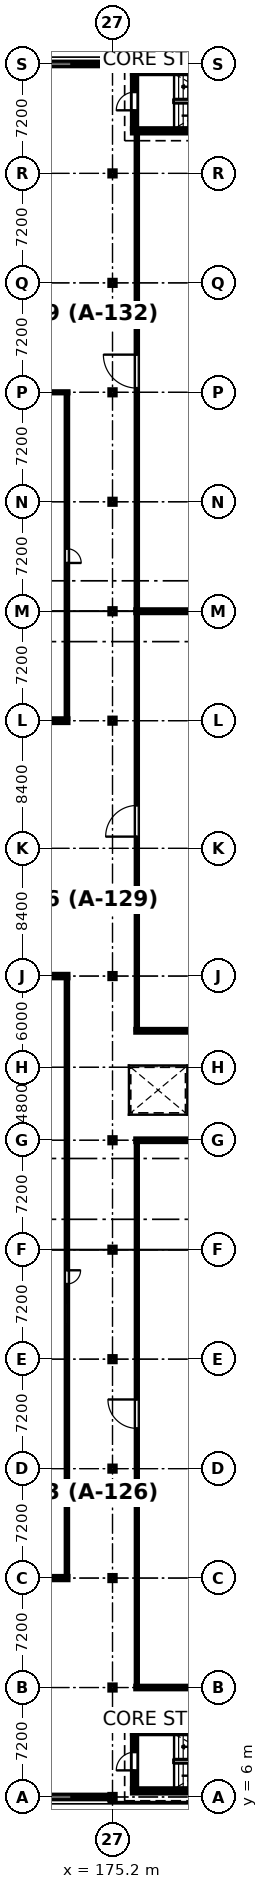
"""IFC4 building model, lengths in metres.
Left out: names, types, materials, properties, quantities, classifications, styles, units other than length and angle.
Written with IfcOpenShell. Run it as: python <this file> out.ifc"""

import sys

from ifc_helpers import new_model, si_unit, direction, frame, frame_2d, origin, origin_2d, place, context, subcontext, project, spatial, rectangle, i_section, extrude, element, fill, save


model = new_model("IFC4")
c1 = context("Model", 3, precision=1e-05, world=origin(), true_north=direction((0.0, 1.0)))
c2 = subcontext(c1, "Body", "Model", "MODEL_VIEW")
j1 = project(units=[si_unit("LENGTHUNIT", "METRE"), si_unit("PLANEANGLEUNIT", "RADIAN")], contexts=[c1])
p1 = place(None, origin())
s1 = spatial("IfcSite", under=j1, at=p1, CompositionType="ELEMENT")
p2 = place(p1, origin())
s2 = spatial("IfcBuilding", under=s1, at=p2, CompositionType="ELEMENT")
p3 = place(p2, frame((0.0, 0.0, 9.3)))
s3 = spatial("IfcBuildingStorey", under=s2, at=p3, CompositionType="ELEMENT", Elevation=9.3)
for number, where, z_axis, x_axis in (
    (1, (175.2, 6.0, 0.0), (0.0, 0.0, 1.0), (1.0, 0.0, 0.0)),
    (2, (175.2, 13.2, 0.0), (0.0, 0.0, 1.0), (1.0, 0.0, 0.0)),
    (3, (175.2, 20.4, 0.0), (0.0, 0.0, 1.0), (1.0, 0.0, 0.0)),
    (4, (175.2, 27.6, 0.0), (0.0, 0.0, 1.0), (1.0, 0.0, 0.0)),
    (5, (175.2, 34.8, 0.0), (0.0, 0.0, 1.0), (1.0, 0.0, 0.0)),
    (6, (175.2, 42.0, 0.0), (0.0, 0.0, 1.0), (1.0, 0.0, 0.0)),
    (7, (175.2, 49.2, 0.0), (0.0, 0.0, 1.0), (1.0, 0.0, 0.0)),
    (8, (175.2, 60.0, 0.0), (0.0, 0.0, 1.0), (1.0, 0.0, 0.0)),
    (9, (175.2, 76.8, 0.0), (0.0, 0.0, 1.0), (1.0, 0.0, 0.0)),
    (10, (175.2, 84.0, 0.0), (0.0, 0.0, 1.0), (1.0, 0.0, 0.0)),
    (11, (175.2, 91.2, 0.0), (0.0, 0.0, 1.0), (1.0, 0.0, 0.0)),
    (12, (175.2, 98.4, 0.0), (0.0, 0.0, 1.0), (1.0, 0.0, 0.0)),
    (13, (175.2, 105.6, 0.0), (0.0, 0.0, 1.0), (1.0, 0.0, 0.0)),
    (14, (175.2, 112.8, 0.0), (0.0, 0.0, 1.0), (1.0, 0.0, 0.0)),
    (15, (175.2, 120.0, 0.0), (0.0, 0.0, 1.0), (1.0, 0.0, 0.0)),
):
    element("IfcColumn", number, at=place(p3, frame(where, z_axis=z_axis, x_axis=x_axis)), inside=s3, PredefinedType="COLUMN", context=c2, shape_type="SweptSolid", body=[
        extrude(i_section(OverallWidth=0.368, OverallDepth=0.356, WebThickness=0.011, FlangeThickness=0.018, FilletRadius=0.015, at=origin_2d()), origin(), (0.0, 0.0, 1.0), 3.9),
    ])
p4 = place(p3, frame((175.009, 6.0, 0.0), z_axis=(0.0, 0.0, 1.0), x_axis=(-1.0, 0.0, 0.0)))
e16 = element("IfcWall", 16, at=p4, inside=s3, PredefinedType="STANDARD", context=c2, shape_type="SweptSolid", body=[
    extrude(rectangle(XDim=6.818, YDim=0.26, at=frame_2d((3.409, 0.0))), origin(), (0.0, 0.0, 1.0), 2.828),
])
p5 = place(p4, frame((2.509, 0.0, 0.9)))
e17 = element("IfcOpeningElement", 17, at=p5, cuts=e16, PredefinedType="OPENING", context=c2, shape_type="SweptSolid", body=[
    extrude(rectangle(XDim=1.8, YDim=1.5, at=frame_2d((0.9, 0.75))), frame((0.0, 0.14, 0.0), z_axis=(0.0, -1.0, 0.0), x_axis=(1.0, 0.0, 0.0)), (0.0, 0.0, 1.0), 0.28),
])
p6 = place(p3, frame((168.191, 120.0, 0.0), z_axis=(0.0, 0.0, 1.0), x_axis=(1.0, 0.0, 0.0)))
e18 = element("IfcWall", 18, at=p6, inside=s3, PredefinedType="STANDARD", context=c2, shape_type="SweptSolid", body=[
    extrude(rectangle(XDim=6.818, YDim=0.26, at=frame_2d((3.409, 0.0))), origin(), (0.0, 0.0, 1.0), 2.828),
])
p7 = place(p6, frame((2.509, 0.0, 0.9)))
e19 = element("IfcOpeningElement", 19, at=p7, cuts=e18, PredefinedType="OPENING", context=c2, shape_type="SweptSolid", body=[
    extrude(rectangle(XDim=1.8, YDim=1.5, at=frame_2d((0.9, 0.75))), frame((0.0, 0.14, 0.0), z_axis=(0.0, -1.0, 0.0), x_axis=(1.0, 0.0, 0.0)), (0.0, 0.0, 1.0), 0.28),
])
for number, where, z_axis, x_axis in (
    (20, (185.9, 6.4, 0.0), (0.0, 0.0, 1.0), (-1.0, 0.0, 0.0)),
    (21, (176.5, 10.3, 0.0), (0.0, 0.0, 1.0), (1.0, 0.0, 0.0)),
):
    element("IfcWall", number, at=place(p3, frame(where, z_axis=z_axis, x_axis=x_axis)), inside=s3, PredefinedType="SOLIDWALL", context=c2, shape_type="SweptSolid", body=[
        extrude(rectangle(XDim=9.4, YDim=0.3, at=frame_2d((4.7, 0.0))), origin(), (0.0, 0.0, 1.0), 3.6),
    ])
p8 = place(p3, frame((176.65, 6.55, 0.0), z_axis=(0.0, 0.0, 1.0), x_axis=(0.0, 1.0, 0.0)))
e22 = element("IfcWall", 22, at=p8, inside=s3, PredefinedType="SOLIDWALL", context=c2, shape_type="SweptSolid", body=[
    extrude(rectangle(XDim=3.6, YDim=0.3, at=frame_2d((1.8, 0.0))), origin(), (0.0, 0.0, 1.0), 3.6),
])
p9 = place(p8, frame((1.2, 0.0, 0.0)))
e23 = element("IfcOpeningElement", 23, at=p9, cuts=e22, PredefinedType="OPENING", context=c2, shape_type="SweptSolid", body=[
    extrude(rectangle(XDim=1.2, YDim=2.2, at=frame_2d((0.6, 1.1))), frame((0.0, 0.16, 0.0), z_axis=(0.0, -1.0, 0.0), x_axis=(1.0, 0.0, 0.0)), (0.0, 0.0, 1.0), 0.32),
])
for number, where, z_axis, x_axis in (
    (24, (185.9, 115.6, 0.0), (0.0, 0.0, 1.0), (-1.0, 0.0, 0.0)),
    (25, (176.5, 119.5, 0.0), (0.0, 0.0, 1.0), (1.0, 0.0, 0.0)),
):
    element("IfcWall", number, at=place(p3, frame(where, z_axis=z_axis, x_axis=x_axis)), inside=s3, PredefinedType="SOLIDWALL", context=c2, shape_type="SweptSolid", body=[
        extrude(rectangle(XDim=9.4, YDim=0.3, at=frame_2d((4.7, 0.0))), origin(), (0.0, 0.0, 1.0), 3.6),
    ])
p10 = place(p3, frame((176.65, 115.75, 0.0), z_axis=(0.0, 0.0, 1.0), x_axis=(0.0, 1.0, 0.0)))
e26 = element("IfcWall", 26, at=p10, inside=s3, PredefinedType="SOLIDWALL", context=c2, shape_type="SweptSolid", body=[
    extrude(rectangle(XDim=3.6, YDim=0.3, at=frame_2d((1.8, 0.0))), origin(), (0.0, 0.0, 1.0), 3.6),
])
p11 = place(p10, frame((1.2, 0.0, 0.0)))
e27 = element("IfcOpeningElement", 27, at=p11, cuts=e26, PredefinedType="OPENING", context=c2, shape_type="SweptSolid", body=[
    extrude(rectangle(XDim=1.2, YDim=2.2, at=frame_2d((0.6, 1.1))), frame((0.0, 0.16, 0.0), z_axis=(0.0, -1.0, 0.0), x_axis=(1.0, 0.0, 0.0)), (0.0, 0.0, 1.0), 0.32),
])
p12 = place(p3, frame((189.468, 13.2, 0.0), z_axis=(0.0, 0.0, 1.0), x_axis=(-1.0, 0.0, 0.0)))
e28 = element("IfcWall", 28, at=p12, inside=s3, PredefinedType="PARTITIONING", context=c2, shape_type="SweptSolid", body=[
    extrude(rectangle(XDim=12.748, YDim=0.192, at=frame_2d((6.374, 0.0))), origin(), (0.0, 0.0, 1.0), 2.823),
])
p13 = place(p3, frame((176.72, 49.2, 0.0), z_axis=(0.0, 0.0, 1.0), x_axis=(1.0, 0.0, 0.0)))
e29 = element("IfcWall", 29, at=p13, inside=s3, PredefinedType="PARTITIONING", context=c2, shape_type="SweptSolid", body=[
    extrude(rectangle(XDim=12.748, YDim=0.198, at=frame_2d((6.374, 0.0))), origin(), (0.0, 0.0, 1.0), 2.823),
])
p14 = place(p3, frame((189.468, 56.4, 0.0), z_axis=(0.0, 0.0, 1.0), x_axis=(-1.0, 0.0, 0.0)))
e30 = element("IfcWall", 30, at=p14, inside=s3, PredefinedType="PARTITIONING", context=c2, shape_type="SweptSolid", body=[
    extrude(rectangle(XDim=12.748, YDim=0.205, at=frame_2d((6.374, 0.0))), origin(), (0.0, 0.0, 1.0), 2.823),
])
p15 = place(p3, frame((176.72, 84.0, 0.0), z_axis=(0.0, 0.0, 1.0), x_axis=(1.0, 0.0, 0.0)))
e31 = element("IfcWall", 31, at=p15, inside=s3, PredefinedType="PARTITIONING", context=c2, shape_type="SweptSolid", body=[
    extrude(rectangle(XDim=12.748, YDim=0.212, at=frame_2d((6.374, 0.0))), origin(), (0.0, 0.0, 1.0), 2.823),
])
p16 = place(p3, frame((172.28, 20.4, 0.0), z_axis=(0.0, 0.0, 1.0), x_axis=(-1.0, 0.0, 0.0)))
e32 = element("IfcWall", 32, at=p16, inside=s3, PredefinedType="PARTITIONING", context=c2, shape_type="SweptSolid", body=[
    extrude(rectangle(XDim=18.548, YDim=0.235, at=frame_2d((9.274, 0.0))), origin(), (0.0, 0.0, 1.0), 2.823),
])
p17 = place(p3, frame((153.732, 60.0, 0.0), z_axis=(0.0, 0.0, 1.0), x_axis=(1.0, 0.0, 0.0)))
e33 = element("IfcWall", 33, at=p17, inside=s3, PredefinedType="PARTITIONING", context=c2, shape_type="SweptSolid", body=[
    extrude(rectangle(XDim=18.548, YDim=0.25, at=frame_2d((9.274, 0.0))), origin(), (0.0, 0.0, 1.0), 2.823),
])
p18 = place(p3, frame((172.28, 76.8, 0.0), z_axis=(0.0, 0.0, 1.0), x_axis=(-1.0, 0.0, 0.0)))
e34 = element("IfcWall", 34, at=p18, inside=s3, PredefinedType="PARTITIONING", context=c2, shape_type="SweptSolid", body=[
    extrude(rectangle(XDim=18.548, YDim=0.27, at=frame_2d((9.274, 0.0))), origin(), (0.0, 0.0, 1.0), 2.823),
])
p19 = place(p3, frame((153.732, 98.4, 0.0), z_axis=(0.0, 0.0, 1.0), x_axis=(1.0, 0.0, 0.0)))
e35 = element("IfcWall", 35, at=p19, inside=s3, PredefinedType="PARTITIONING", context=c2, shape_type="SweptSolid", body=[
    extrude(rectangle(XDim=18.548, YDim=0.095, at=frame_2d((9.274, 0.0))), origin(), (0.0, 0.0, 1.0), 2.823),
])
p20 = place(p3, frame((176.8, 13.298, 0.0), z_axis=(0.0, 0.0, 1.0), x_axis=(0.0, 1.0, 0.0)))
e36 = element("IfcWall", 36, at=p20, inside=s3, PredefinedType="PARTITIONING", context=c2, shape_type="SweptSolid", body=[
    extrude(rectangle(XDim=35.801, YDim=0.1, at=frame_2d((17.9, 0.0))), origin(), (0.0, 0.0, 1.0), 2.823),
])
p21 = place(p20, frame((16.95, 0.0, 0.0)))
e37 = element("IfcOpeningElement", 37, at=p21, cuts=e36, PredefinedType="OPENING", context=c2, shape_type="SweptSolid", body=[
    extrude(rectangle(XDim=1.9, YDim=2.34, at=frame_2d((0.95, 1.17))), frame((0.0, 0.06, 0.0), z_axis=(0.0, -1.0, 0.0), x_axis=(1.0, 0.0, 0.0)), (0.0, 0.0, 1.0), 0.12),
])
p22 = place(p20, frame((20.1, 0.0, 0.95)))
e38 = element("IfcOpeningElement", 38, at=p22, cuts=e36, PredefinedType="OPENING", context=c2, shape_type="SweptSolid", body=[
    extrude(rectangle(XDim=1.2, YDim=1.0, at=frame_2d((0.6, 0.5))), frame((0.0, 0.06, 0.0), z_axis=(0.0, -1.0, 0.0), x_axis=(1.0, 0.0, 0.0)), (0.0, 0.0, 1.0), 0.12),
])
p23 = place(p3, frame((176.8, 56.504, 0.0), z_axis=(0.0, 0.0, 1.0), x_axis=(0.0, 1.0, 0.0)))
e39 = element("IfcWall", 39, at=p23, inside=s3, PredefinedType="PARTITIONING", context=c2, shape_type="SweptSolid", body=[
    extrude(rectangle(XDim=27.388, YDim=0.105, at=frame_2d((13.694, 0.0))), origin(), (0.0, 0.0, 1.0), 2.823),
])
p24 = place(p23, frame((12.669, 0.0, 0.0)))
e40 = element("IfcOpeningElement", 40, at=p24, cuts=e39, PredefinedType="OPENING", context=c2, shape_type="SweptSolid", body=[
    extrude(rectangle(XDim=2.05, YDim=2.34, at=frame_2d((1.025, 1.17))), frame((0.0, 0.062, 0.0), z_axis=(0.0, -1.0, 0.0), x_axis=(1.0, 0.0, 0.0)), (0.0, 0.0, 1.0), 0.125),
])
p25 = place(p3, frame((176.8, 84.108, 0.0), z_axis=(0.0, 0.0, 1.0), x_axis=(0.0, 1.0, 0.0)))
e41 = element("IfcWall", 41, at=p25, inside=s3, PredefinedType="PARTITIONING", context=c2, shape_type="SweptSolid", body=[
    extrude(rectangle(XDim=31.34, YDim=0.11, at=frame_2d((15.67, 0.0))), origin(), (0.0, 0.0, 1.0), 2.823),
])
p26 = place(p25, frame((14.57, 0.0, 0.0)))
e42 = element("IfcOpeningElement", 42, at=p26, cuts=e41, PredefinedType="OPENING", context=c2, shape_type="SweptSolid", body=[
    extrude(rectangle(XDim=2.2, YDim=2.34, at=frame_2d((1.1, 1.17))), frame((0.0, 0.065, 0.0), z_axis=(0.0, -1.0, 0.0), x_axis=(1.0, 0.0, 0.0)), (0.0, 0.0, 1.0), 0.13),
])
p27 = place(p3, frame((172.2, 59.873, 0.0), z_axis=(0.0, 0.0, 1.0), x_axis=(0.0, -1.0, 0.0)))
e43 = element("IfcWall", 43, at=p27, inside=s3, PredefinedType="PARTITIONING", context=c2, shape_type="SweptSolid", body=[
    extrude(rectangle(XDim=39.354, YDim=0.115, at=frame_2d((19.677, 0.0))), origin(), (0.0, 0.0, 1.0), 2.823),
])
p28 = place(p27, frame((19.227, 0.0, 0.0)))
e44 = element("IfcOpeningElement", 44, at=p28, cuts=e43, PredefinedType="OPENING", context=c2, shape_type="SweptSolid", body=[
    extrude(rectangle(XDim=0.9, YDim=2.1, at=frame_2d((0.45, 1.05))), frame((0.0, 0.067, 0.0), z_axis=(0.0, -1.0, 0.0), x_axis=(1.0, 0.0, 0.0)), (0.0, 0.0, 1.0), 0.135),
])
p29 = place(p27, frame((21.377, 0.0, 0.95)))
e45 = element("IfcOpeningElement", 45, at=p29, cuts=e43, PredefinedType="OPENING", context=c2, shape_type="SweptSolid", body=[
    extrude(rectangle(XDim=1.4, YDim=1.0, at=frame_2d((0.7, 0.5))), frame((0.0, 0.067, 0.0), z_axis=(0.0, -1.0, 0.0), x_axis=(1.0, 0.0, 0.0)), (0.0, 0.0, 1.0), 0.135),
])
p30 = place(p3, frame((172.2, 98.351, 0.0), z_axis=(0.0, 0.0, 1.0), x_axis=(0.0, -1.0, 0.0)))
e46 = element("IfcWall", 46, at=p30, inside=s3, PredefinedType="PARTITIONING", context=c2, shape_type="SweptSolid", body=[
    extrude(rectangle(XDim=21.414, YDim=0.12, at=frame_2d((10.707, 0.0))), origin(), (0.0, 0.0, 1.0), 2.823),
])
p31 = place(p30, frame((10.237, 0.0, 0.0)))
e47 = element("IfcOpeningElement", 47, at=p31, cuts=e46, PredefinedType="OPENING", context=c2, shape_type="SweptSolid", body=[
    extrude(rectangle(XDim=0.94, YDim=2.1, at=frame_2d((0.47, 1.05))), frame((0.0, 0.07, 0.0), z_axis=(0.0, -1.0, 0.0), x_axis=(1.0, 0.0, 0.0)), (0.0, 0.0, 1.0), 0.14),
])
p32 = place(p5, origin())
e48 = element("IfcWindow", 48, at=p32, inside=s3, PartitioningType="SINGLE_PANEL", PredefinedType="WINDOW", context=c2, shape_type="SweptSolid", body=[
    extrude(rectangle(XDim=1.8, YDim=1.5, at=frame_2d((0.9, 0.75))), frame((0.0, 0.03, 0.0), z_axis=(0.0, -1.0, 0.0), x_axis=(1.0, 0.0, 0.0)), (0.0, 0.0, 1.0), 0.06),
])
fill(e17, e48)
p33 = place(p7, origin())
e49 = element("IfcWindow", 49, at=p33, inside=s3, PartitioningType="SINGLE_PANEL", PredefinedType="WINDOW", context=c2, shape_type="SweptSolid", body=[
    extrude(rectangle(XDim=1.8, YDim=1.5, at=frame_2d((0.9, 0.75))), frame((0.0, 0.03, 0.0), z_axis=(0.0, -1.0, 0.0), x_axis=(1.0, 0.0, 0.0)), (0.0, 0.0, 1.0), 0.06),
])
fill(e19, e49)
p34 = place(p9, origin())
e50 = element("IfcDoor", 50, at=p34, inside=s3, OperationType="SINGLE_SWING_LEFT", PredefinedType="DOOR", context=c2, shape_type="SweptSolid", body=[
    extrude(rectangle(XDim=1.2, YDim=2.2, at=frame_2d((0.6, 1.1))), frame((0.0, 0.025, 0.0), z_axis=(0.0, -1.0, 0.0), x_axis=(1.0, 0.0, 0.0)), (0.0, 0.0, 1.0), 0.05),
])
fill(e23, e50)
p35 = place(p11, origin())
e51 = element("IfcDoor", 51, at=p35, inside=s3, OperationType="SINGLE_SWING_LEFT", PredefinedType="DOOR", context=c2, shape_type="SweptSolid", body=[
    extrude(rectangle(XDim=1.2, YDim=2.2, at=frame_2d((0.6, 1.1))), frame((0.0, 0.025, 0.0), z_axis=(0.0, -1.0, 0.0), x_axis=(1.0, 0.0, 0.0)), (0.0, 0.0, 1.0), 0.05),
])
fill(e27, e51)
p36 = place(p21, origin())
e52 = element("IfcDoor", 52, at=p36, inside=s3, OperationType="SINGLE_SWING_RIGHT", PredefinedType="DOOR", context=c2, shape_type="SweptSolid", body=[
    extrude(rectangle(XDim=1.9, YDim=2.34, at=frame_2d((0.95, 1.17))), frame((0.0, 0.025, 0.0), z_axis=(0.0, -1.0, 0.0), x_axis=(1.0, 0.0, 0.0)), (0.0, 0.0, 1.0), 0.05),
])
fill(e37, e52)
p37 = place(p22, origin())
e53 = element("IfcWindow", 53, at=p37, inside=s3, PartitioningType="SINGLE_PANEL", PredefinedType="WINDOW", context=c2, shape_type="SweptSolid", body=[
    extrude(rectangle(XDim=1.2, YDim=1.0, at=frame_2d((0.6, 0.5))), frame((0.0, 0.03, 0.0), z_axis=(0.0, -1.0, 0.0), x_axis=(1.0, 0.0, 0.0)), (0.0, 0.0, 1.0), 0.06),
])
fill(e38, e53)
p38 = place(p24, origin())
e54 = element("IfcDoor", 54, at=p38, inside=s3, OperationType="SINGLE_SWING_LEFT", PredefinedType="DOOR", context=c2, shape_type="SweptSolid", body=[
    extrude(rectangle(XDim=2.05, YDim=2.34, at=frame_2d((1.025, 1.17))), frame((0.0, 0.025, 0.0), z_axis=(0.0, -1.0, 0.0), x_axis=(1.0, 0.0, 0.0)), (0.0, 0.0, 1.0), 0.05),
])
fill(e40, e54)
p39 = place(p26, origin())
e55 = element("IfcDoor", 55, at=p39, inside=s3, OperationType="SINGLE_SWING_RIGHT", PredefinedType="DOOR", context=c2, shape_type="SweptSolid", body=[
    extrude(rectangle(XDim=2.2, YDim=2.34, at=frame_2d((1.1, 1.17))), frame((0.0, 0.025, 0.0), z_axis=(0.0, -1.0, 0.0), x_axis=(1.0, 0.0, 0.0)), (0.0, 0.0, 1.0), 0.05),
])
fill(e42, e55)
p40 = place(p28, origin())
e56 = element("IfcDoor", 56, at=p40, inside=s3, OperationType="SINGLE_SWING_LEFT", PredefinedType="DOOR", context=c2, shape_type="SweptSolid", body=[
    extrude(rectangle(XDim=0.9, YDim=2.1, at=frame_2d((0.45, 1.05))), frame((0.0, 0.025, 0.0), z_axis=(0.0, -1.0, 0.0), x_axis=(1.0, 0.0, 0.0)), (0.0, 0.0, 1.0), 0.05),
])
fill(e44, e56)
p41 = place(p29, origin())
e57 = element("IfcWindow", 57, at=p41, inside=s3, PartitioningType="SINGLE_PANEL", PredefinedType="WINDOW", context=c2, shape_type="SweptSolid", body=[
    extrude(rectangle(XDim=1.4, YDim=1.0, at=frame_2d((0.7, 0.5))), frame((0.0, 0.03, 0.0), z_axis=(0.0, -1.0, 0.0), x_axis=(1.0, 0.0, 0.0)), (0.0, 0.0, 1.0), 0.06),
])
fill(e45, e57)
p42 = place(p31, origin())
e58 = element("IfcDoor", 58, at=p42, inside=s3, OperationType="SINGLE_SWING_RIGHT", PredefinedType="DOOR", context=c2, shape_type="SweptSolid", body=[
    extrude(rectangle(XDim=0.94, YDim=2.1, at=frame_2d((0.47, 1.05))), frame((0.0, 0.025, 0.0), z_axis=(0.0, -1.0, 0.0), x_axis=(1.0, 0.0, 0.0)), (0.0, 0.0, 1.0), 0.05),
])
fill(e47, e58)
save(model, sys.argv[1])
